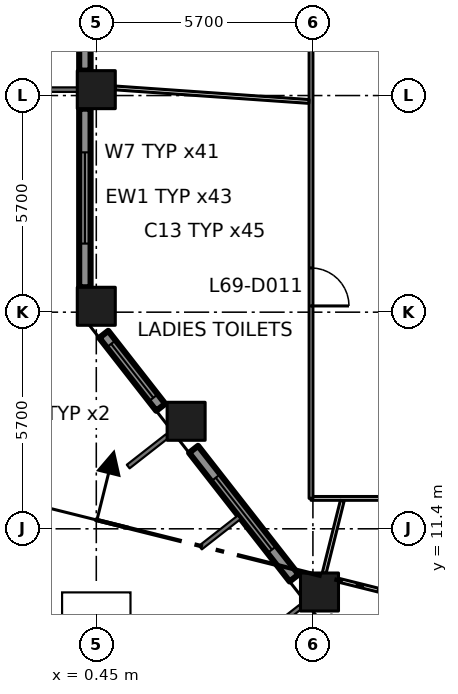
"""IFC4 building model, lengths in metres.
Left out: names, types, materials, properties, quantities, classifications, styles, units other than length and angle.
Written with IfcOpenShell. Run it as: python <this file> out.ifc"""

import sys

from ifc_helpers import new_model, si_unit, direction, frame, frame_2d, origin, origin_2d, place, context, subcontext, project, spatial, rectangle, extrude, element, fill, save


model = new_model("IFC4")
c1 = context("Model", 3, precision=1e-05, world=origin(), true_north=direction((0.0, 1.0)))
c2 = subcontext(c1, "Body", "Model", "MODEL_VIEW")
j1 = project(units=[si_unit("LENGTHUNIT", "METRE"), si_unit("PLANEANGLEUNIT", "RADIAN")], contexts=[c1])
p1 = place(None, origin())
s1 = spatial("IfcSite", under=j1, at=p1, CompositionType="ELEMENT")
p2 = place(p1, origin())
s2 = spatial("IfcBuilding", under=s1, at=p2, CompositionType="ELEMENT")
p3 = place(p2, frame((0.0, 0.0, 302.4)))
s3 = spatial("IfcBuildingStorey", under=s2, at=p3, CompositionType="ELEMENT", Elevation=302.4)
for number, where, z_axis, x_axis in (
    (1, (0.45, 17.255, 0.0), (0.0, 0.0, 1.0), (1.0, 0.0, 0.0)),
    (2, (0.45, 22.955, 0.0), (0.0, 0.0, 1.0), (1.0, 0.0, 0.0)),
    (3, (6.323, 9.737, 0.0), (0.0, 0.0, 1.0), (1.0, 0.0, 0.0)),
    (4, (2.814, 14.229, 0.0), (0.0, 0.0, 1.0), (1.0, 0.0, 0.0)),
):
    element("IfcColumn", number, at=place(p3, frame(where, z_axis=z_axis, x_axis=x_axis)), inside=s3, PredefinedType="COLUMN", context=c2, shape_type="SweptSolid", body=[
        extrude(rectangle(XDim=1.0, YDim=1.0, at=origin_2d()), origin(), (0.0, 0.0, 1.0), 4.2),
    ])
p4 = place(p3, frame((0.15, 28.155, 0.0), z_axis=(0.0, 0.0, 1.0), x_axis=(0.0, -1.0, 0.0)))
e5 = element("IfcWall", 5, at=p4, inside=s3, PredefinedType="SOLIDWALL", context=c2, shape_type="SweptSolid", body=[
    extrude(rectangle(XDim=4.7, YDim=0.3, at=frame_2d((2.35, 0.0))), origin(), (0.0, 0.0, 1.0), 3.2),
])
p5 = place(p4, frame((1.15, 0.0, 0.8)))
e6 = element("IfcOpeningElement", 6, at=p5, cuts=e5, PredefinedType="OPENING", context=c2, shape_type="SweptSolid", body=[
    extrude(rectangle(XDim=2.4, YDim=2.1, at=frame_2d((1.2, 1.05))), frame((0.0, 0.16, 0.0), z_axis=(0.0, -1.0, 0.0), x_axis=(1.0, 0.0, 0.0)), (0.0, 0.0, 1.0), 0.32),
])
p6 = place(p3, frame((0.15, 22.455, 0.0), z_axis=(0.0, 0.0, 1.0), x_axis=(0.0, -1.0, 0.0)))
e7 = element("IfcWall", 7, at=p6, inside=s3, PredefinedType="SOLIDWALL", context=c2, shape_type="SweptSolid", body=[
    extrude(rectangle(XDim=4.7, YDim=0.3, at=frame_2d((2.35, 0.0))), origin(), (0.0, 0.0, 1.0), 3.2),
])
p7 = place(p6, frame((1.15, 0.0, 0.8)))
e8 = element("IfcOpeningElement", 8, at=p7, cuts=e7, PredefinedType="OPENING", context=c2, shape_type="SweptSolid", body=[
    extrude(rectangle(XDim=2.4, YDim=2.1, at=frame_2d((1.2, 1.05))), frame((0.0, 0.16, 0.0), z_axis=(0.0, -1.0, 0.0), x_axis=(1.0, 0.0, 0.0)), (0.0, 0.0, 1.0), 0.32),
])
p8 = place(p3, frame((0.646, 16.517, 0.0), z_axis=(0.0, 0.0, 1.0), x_axis=(0.615610986717, -0.788050197026, 0.0)))
e9 = element("IfcWall", 9, at=p8, inside=s3, PredefinedType="SOLIDWALL", context=c2, shape_type="SweptSolid", body=[
    extrude(rectangle(XDim=2.437, YDim=0.3, at=frame_2d((1.218, 0.0))), origin(), (0.0, 0.0, 1.0), 3.2),
])
p9 = place(p8, frame((0.318, 0.0, 0.8)))
e10 = element("IfcOpeningElement", 10, at=p9, cuts=e9, PredefinedType="OPENING", context=c2, shape_type="SweptSolid", body=[
    extrude(rectangle(XDim=1.8, YDim=2.1, at=frame_2d((0.9, 1.05))), frame((0.0, 0.16, 0.0), z_axis=(0.0, -1.0, 0.0), x_axis=(1.0, 0.0, 0.0)), (0.0, 0.0, 1.0), 0.32),
])
p10 = place(p3, frame((3.01, 13.491, 0.0), z_axis=(0.0, 0.0, 1.0), x_axis=(0.615713519567, -0.787970089421, 0.0)))
e11 = element("IfcWall", 11, at=p10, inside=s3, PredefinedType="SOLIDWALL", context=c2, shape_type="SweptSolid", body=[
    extrude(rectangle(XDim=4.296, YDim=0.3, at=frame_2d((2.148, 0.0))), origin(), (0.0, 0.0, 1.0), 3.2),
])
p11 = place(p10, frame((0.948, 0.0, 0.8)))
e12 = element("IfcOpeningElement", 12, at=p11, cuts=e11, PredefinedType="OPENING", context=c2, shape_type="SweptSolid", body=[
    extrude(rectangle(XDim=2.4, YDim=2.1, at=frame_2d((1.2, 1.05))), frame((0.0, 0.16, 0.0), z_axis=(0.0, -1.0, 0.0), x_axis=(1.0, 0.0, 0.0)), (0.0, 0.0, 1.0), 0.32),
])
p12 = place(p3, frame((6.1, 12.2, 0.0), z_axis=(0.0, 0.0, 1.0), x_axis=(1.0, 0.0, 0.0)))
e13 = element("IfcWall", 13, at=p12, inside=s3, PredefinedType="PARTITIONING", context=c2, shape_type="SweptSolid", body=[
    extrude(rectangle(XDim=3.8, YDim=0.1, at=frame_2d((1.9, 0.0))), origin(), (0.0, 0.0, 1.0), 3.9),
])
p13 = place(p3, frame((6.1, 38.9, 0.0), z_axis=(0.0, 0.0, 1.0), x_axis=(0.0, -1.0, 0.0)))
e14 = element("IfcWall", 14, at=p13, inside=s3, PredefinedType="PARTITIONING", context=c2, shape_type="SweptSolid", body=[
    extrude(rectangle(XDim=26.7, YDim=0.1, at=frame_2d((13.35, 0.0))), origin(), (0.0, 0.0, 1.0), 3.9),
])
p14 = place(p13, frame((20.636, 0.0, 0.0)))
e15 = element("IfcOpeningElement", 15, at=p14, cuts=e14, PredefinedType="OPENING", context=c2, shape_type="SweptSolid", body=[
    extrude(rectangle(XDim=1.0, YDim=2.1, at=frame_2d((0.5, 1.05))), frame((0.0, 0.06, 0.0), z_axis=(0.0, -1.0, 0.0), x_axis=(1.0, 0.0, 0.0)), (0.0, 0.0, 1.0), 0.12),
])
p15 = place(p13, frame((6.88, 0.0, 0.0)))
e16 = element("IfcOpeningElement", 16, at=p15, cuts=e14, PredefinedType="OPENING", context=c2, shape_type="SweptSolid", body=[
    extrude(rectangle(XDim=1.8, YDim=2.1, at=frame_2d((0.9, 1.05))), frame((0.0, 0.06, 0.0), z_axis=(0.0, -1.0, 0.0), x_axis=(1.0, 0.0, 0.0)), (0.0, 0.0, 1.0), 0.12),
])
p16 = place(p3, frame((6.047, 22.644, 0.0), z_axis=(0.0, 0.0, 1.0), x_axis=(-0.997570469691, 0.069664610825, 0.0)))
e17 = element("IfcWall", 17, at=p16, inside=s3, PredefinedType="PARTITIONING", context=c2, shape_type="SweptSolid", body=[
    extrude(rectangle(XDim=5.11, YDim=0.1, at=frame_2d((2.555, 0.0))), origin(), (0.0, 0.0, 1.0), 3.9),
])
p17 = place(p3, frame((6.922, 12.138, 0.0), z_axis=(0.0, 0.0, 1.0), x_axis=(-0.242476987996, -0.970157157523, 0.0)))
e18 = element("IfcWall", 18, at=p17, inside=s3, PredefinedType="PARTITIONING", context=c2, shape_type="SweptSolid", body=[
    extrude(rectangle(XDim=1.959, YDim=0.1, at=frame_2d((0.98, 0.0))), origin(), (0.0, 0.0, 1.0), 3.9),
])
p18 = place(p3, frame((8.72, 9.575, 0.0), z_axis=(0.0, 0.0, 1.0), x_axis=(-0.970274576003, 0.242006708918, 0.0)))
e19 = element("IfcWall", 19, at=p18, inside=s3, PredefinedType="PARTITIONING", context=c2, shape_type="SweptSolid", body=[
    extrude(rectangle(XDim=1.955, YDim=0.1, at=frame_2d((0.978, 0.0))), origin(), (0.0, 0.0, 1.0), 3.9),
])
p19 = place(p7, origin())
e20 = element("IfcWindow", 20, at=p19, inside=s3, PartitioningType="DOUBLE_PANEL_VERTICAL", PredefinedType="WINDOW", context=c2, shape_type="SweptSolid", body=[
    extrude(rectangle(XDim=2.4, YDim=2.1, at=frame_2d((1.2, 1.05))), frame((0.0, 0.03, 0.0), z_axis=(0.0, -1.0, 0.0), x_axis=(1.0, 0.0, 0.0)), (0.0, 0.0, 1.0), 0.06),
])
fill(e8, e20)
p20 = place(p9, origin())
e21 = element("IfcWindow", 21, at=p20, inside=s3, PartitioningType="DOUBLE_PANEL_VERTICAL", PredefinedType="WINDOW", context=c2, shape_type="SweptSolid", body=[
    extrude(rectangle(XDim=1.8, YDim=2.1, at=frame_2d((0.9, 1.05))), frame((0.0, 0.03, 0.0), z_axis=(0.0, -1.0, 0.0), x_axis=(1.0, 0.0, 0.0)), (0.0, 0.0, 1.0), 0.06),
])
fill(e10, e21)
p21 = place(p11, origin())
e22 = element("IfcWindow", 22, at=p21, inside=s3, PartitioningType="DOUBLE_PANEL_VERTICAL", PredefinedType="WINDOW", context=c2, shape_type="SweptSolid", body=[
    extrude(rectangle(XDim=2.4, YDim=2.1, at=frame_2d((1.2, 1.05))), frame((0.0, 0.03, 0.0), z_axis=(0.0, -1.0, 0.0), x_axis=(1.0, 0.0, 0.0)), (0.0, 0.0, 1.0), 0.06),
])
fill(e12, e22)
p22 = place(p14, origin())
e23 = element("IfcDoor", 23, at=p22, inside=s3, OperationType="SINGLE_SWING_RIGHT", PredefinedType="DOOR", context=c2, shape_type="SweptSolid", body=[
    extrude(rectangle(XDim=1.0, YDim=2.1, at=frame_2d((0.5, 1.05))), frame((0.0, 0.025, 0.0), z_axis=(0.0, -1.0, 0.0), x_axis=(1.0, 0.0, 0.0)), (0.0, 0.0, 1.0), 0.05),
])
fill(e15, e23)
save(model, sys.argv[1])
